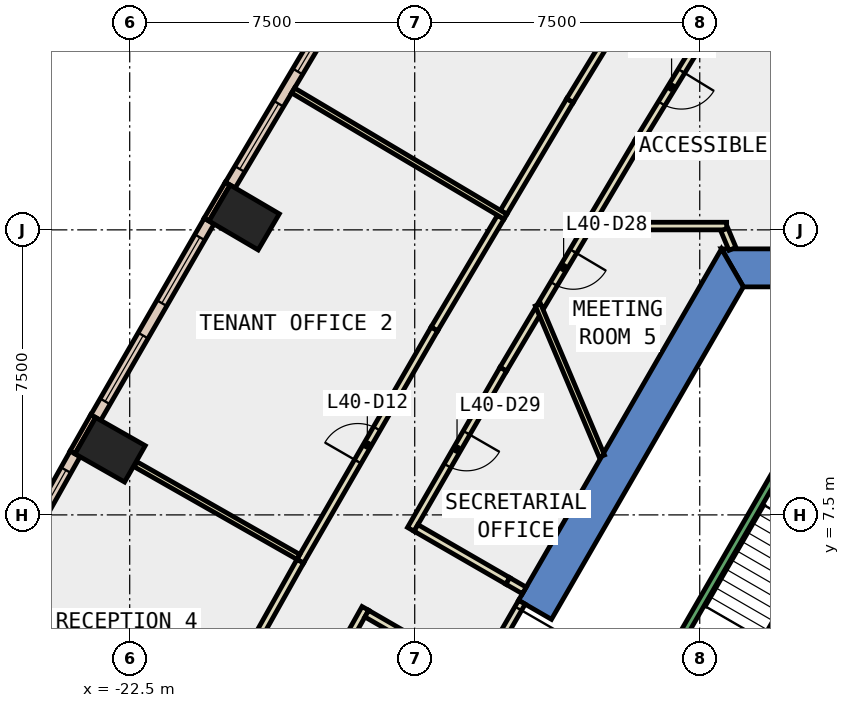
"""IFC4 building model, lengths in metres.
Left out: names, types, materials, properties, quantities, classifications, styles, units other than length and angle.
Written with IfcOpenShell. Run it as: python <this file> out.ifc"""

import sys

from ifc_helpers import new_model, si_unit, direction, frame, frame_2d, origin, origin_2d, place, context, subcontext, project, spatial, polyline, rectangle, outline, extrude, element, fill, save


model = new_model("IFC4")
c1 = context("Model", 3, precision=1e-05, world=origin(), true_north=direction((0.0, 1.0)))
c2 = subcontext(c1, "Body", "Model", "MODEL_VIEW")
j1 = project(units=[si_unit("LENGTHUNIT", "METRE"), si_unit("PLANEANGLEUNIT", "RADIAN")], contexts=[c1])
p1 = place(None, origin())
s1 = spatial("IfcSite", under=j1, at=p1, CompositionType="ELEMENT")
p2 = place(p1, origin())
s2 = spatial("IfcBuilding", under=s1, at=p2, CompositionType="ELEMENT")
p3 = place(p2, frame((0.0, 0.0, 180.2)))
s3 = spatial("IfcBuildingStorey", under=s2, at=p3, CompositionType="ELEMENT", Elevation=180.2)
for number, where, z_axis, x_axis in (
    (1, (-19.488, 15.326, -0.4), (0.0, 0.0, 1.0), (0.506, 0.863, 0.0)),
    (2, (-23.015, 9.214, -0.4), (0.0, 0.0, 1.0), (0.494, 0.869, 0.0)),
):
    element("IfcColumn", number, at=place(p3, frame(where, z_axis=z_axis, x_axis=x_axis)), inside=s3, PredefinedType="COLUMN", context=c2, shape_type="SweptSolid", body=[
        extrude(rectangle(XDim=1.1, YDim=1.5, at=origin_2d()), origin(), (0.0, 0.0, 1.0), 4.0),
    ])
p4 = place(p3, frame((0.0, 0.0, -0.4)))
e3 = element("IfcWall", 3, at=p4, inside=s3, PredefinedType="SHEAR", context=c2, shape_type="SweptSolid", body=[
    extrude(outline(polyline([(6.928, 14.5), (-6.928, 14.5), (-6.351, 13.5), (6.351, 13.5), (6.928, 14.5)])), origin(), (0.0, 0.0, 1.0), 4.0),
])
p5 = place(p3, frame((0.0, 0.0, -0.4)))
e4 = element("IfcWall", 4, at=p5, inside=s3, PredefinedType="SHEAR", context=c2, shape_type="SweptSolid", body=[
    extrude(outline(polyline([(-12.267, 5.252), (-11.402, 4.752), (-6.351, 13.5), (-6.928, 14.5), (-12.267, 5.252)])), origin(), (0.0, 0.0, 1.0), 4.0),
])
p6 = place(p3, frame((-19.921, 16.217, 0.0), z_axis=(0.0, 0.0, 1.0), x_axis=(-0.50667077411, -0.862139621327, 0.0)))
e5 = element("IfcWall", 5, at=p6, inside=s3, PredefinedType="STANDARD", context=c2, shape_type="SweptSolid", body=[
    extrude(rectangle(XDim=1.1, YDim=0.15, at=frame_2d((0.55, 0.0))), origin(), (0.0, 0.0, 1.0), 3.6),
])
p7 = place(p3, frame((-23.461, 10.1, 0.0), z_axis=(0.0, 0.0, 1.0), x_axis=(-0.494512685492, -0.869170411305, 0.0)))
e6 = element("IfcWall", 6, at=p7, inside=s3, PredefinedType="STANDARD", context=c2, shape_type="SweptSolid", body=[
    extrude(rectangle(XDim=1.1, YDim=0.15, at=frame_2d((0.55, 0.0))), origin(), (0.0, 0.0, 1.0), 3.6),
])
p8 = place(p3, frame((-16.806, 21.309, 0.0), z_axis=(0.0, 0.0, 1.0), x_axis=(-0.510653096173, -0.859786842984, 0.0)))
e7 = element("IfcWall", 7, at=p8, inside=s3, PredefinedType="STANDARD", context=c2, shape_type="SweptSolid", body=[
    extrude(rectangle(XDim=5.969, YDim=0.3, at=frame_2d((2.984, 0.0))), origin(), (0.0, 0.0, 1.0), 3.6),
])
p9 = place(p8, frame((0.492, 0.0, 0.9)))
e8 = element("IfcOpeningElement", 8, at=p9, cuts=e7, PredefinedType="OPENING", context=c2, shape_type="SweptSolid", body=[
    extrude(rectangle(XDim=2.0, YDim=2.6, at=frame_2d((1.0, 1.3))), frame((0.0, 0.16, 0.0), z_axis=(0.0, -1.0, 0.0), x_axis=(1.0, 0.0, 0.0)), (0.0, 0.0, 1.0), 0.32),
])
p10 = place(p8, frame((3.477, 0.0, 0.9)))
e9 = element("IfcOpeningElement", 9, at=p10, cuts=e7, PredefinedType="OPENING", context=c2, shape_type="SweptSolid", body=[
    extrude(rectangle(XDim=2.0, YDim=2.6, at=frame_2d((1.0, 1.3))), frame((0.0, 0.16, 0.0), z_axis=(0.0, -1.0, 0.0), x_axis=(1.0, 0.0, 0.0)), (0.0, 0.0, 1.0), 0.32),
])
p11 = place(p3, frame((-20.409, 15.23, 0.0), z_axis=(0.0, 0.0, 1.0), x_axis=(-0.499908916093, -0.866077984716, 0.0)))
e10 = element("IfcWall", 10, at=p11, inside=s3, PredefinedType="STANDARD", context=c2, shape_type="SweptSolid", body=[
    extrude(rectangle(XDim=5.969, YDim=0.3, at=frame_2d((2.985, 0.0))), origin(), (0.0, 0.0, 1.0), 3.6),
])
p12 = place(p11, frame((0.492, 0.0, 0.9)))
e11 = element("IfcOpeningElement", 11, at=p12, cuts=e10, PredefinedType="OPENING", context=c2, shape_type="SweptSolid", body=[
    extrude(rectangle(XDim=2.0, YDim=2.6, at=frame_2d((1.0, 1.3))), frame((0.0, 0.16, 0.0), z_axis=(0.0, -1.0, 0.0), x_axis=(1.0, 0.0, 0.0)), (0.0, 0.0, 1.0), 0.32),
])
p13 = place(p11, frame((3.477, 0.0, 0.9)))
e12 = element("IfcOpeningElement", 12, at=p13, cuts=e10, PredefinedType="OPENING", context=c2, shape_type="SweptSolid", body=[
    extrude(rectangle(XDim=2.0, YDim=2.6, at=frame_2d((1.0, 1.3))), frame((0.0, 0.16, 0.0), z_axis=(0.0, -1.0, 0.0), x_axis=(1.0, 0.0, 0.0)), (0.0, 0.0, 1.0), 0.32),
])
p14 = place(p3, frame((-23.936, 9.106, 0.0), z_axis=(0.0, 0.0, 1.0), x_axis=(-0.489305602904, -0.872112393541, 0.0)))
e13 = element("IfcWall", 13, at=p14, inside=s3, PredefinedType="STANDARD", context=c2, shape_type="SweptSolid", body=[
    extrude(rectangle(XDim=5.969, YDim=0.3, at=frame_2d((2.985, 0.0))), origin(), (0.0, 0.0, 1.0), 3.6),
])
p15 = place(p14, frame((0.492, 0.0, 0.9)))
e14 = element("IfcOpeningElement", 14, at=p15, cuts=e13, PredefinedType="OPENING", context=c2, shape_type="SweptSolid", body=[
    extrude(rectangle(XDim=2.0, YDim=2.6, at=frame_2d((1.0, 1.3))), frame((0.0, 0.16, 0.0), z_axis=(0.0, -1.0, 0.0), x_axis=(1.0, 0.0, 0.0)), (0.0, 0.0, 1.0), 0.32),
])
p16 = place(p14, frame((3.477, 0.0, 0.9)))
e15 = element("IfcOpeningElement", 15, at=p16, cuts=e13, PredefinedType="OPENING", context=c2, shape_type="SweptSolid", body=[
    extrude(rectangle(XDim=2.0, YDim=2.6, at=frame_2d((1.0, 1.3))), frame((0.0, 0.16, 0.0), z_axis=(0.0, -1.0, 0.0), x_axis=(1.0, 0.0, 0.0)), (0.0, 0.0, 1.0), 0.32),
])
p17 = place(p3, frame((-10.484, 15.014, 0.0), z_axis=(0.0, 0.0, 1.0), x_axis=(-0.510627855782, -0.859801833506, 0.0)))
e16 = element("IfcWall", 16, at=p17, inside=s3, PredefinedType="PARTITIONING", context=c2, shape_type="SweptSolid", body=[
    extrude(rectangle(XDim=2.342, YDim=0.2, at=frame_2d((1.171, 0.0))), origin(), (0.0, 0.0, 1.0), 3.6),
])
p18 = place(p17, frame((0.671, 0.0, 0.0)))
e17 = element("IfcOpeningElement", 17, at=p18, cuts=e16, PredefinedType="OPENING", context=c2, shape_type="SweptSolid", body=[
    extrude(rectangle(XDim=1.0, YDim=2.1, at=frame_2d((0.5, 1.05))), frame((0.0, 0.11, 0.0), z_axis=(0.0, -1.0, 0.0), x_axis=(1.0, 0.0, 0.0)), (0.0, 0.0, 1.0), 0.22),
])
p19 = place(p3, frame((-11.757, 12.871, 0.0), z_axis=(0.0, 0.0, 1.0), x_axis=(-0.510614478889, -0.85980977777, 0.0)))
e18 = element("IfcWall", 18, at=p19, inside=s3, PredefinedType="PARTITIONING", context=c2, shape_type="SweptSolid", body=[
    extrude(rectangle(XDim=1.788, YDim=0.2, at=frame_2d((0.894, 0.0))), origin(), (0.0, 0.0, 1.0), 3.6),
])
p20 = place(p3, frame((-12.67, 11.334, 0.0), z_axis=(0.0, 0.0, 1.0), x_axis=(-0.500035159864, -0.866005103276, 0.0)))
e19 = element("IfcWall", 19, at=p20, inside=s3, PredefinedType="PARTITIONING", context=c2, shape_type="SweptSolid", body=[
    extrude(rectangle(XDim=4.866, YDim=0.2, at=frame_2d((2.433, 0.0))), origin(), (0.0, 0.0, 1.0), 3.6),
])
p21 = place(p20, frame((1.933, 0.0, 0.0)))
e20 = element("IfcOpeningElement", 20, at=p21, cuts=e19, PredefinedType="OPENING", context=c2, shape_type="SweptSolid", body=[
    extrude(rectangle(XDim=1.0, YDim=2.1, at=frame_2d((0.5, 1.05))), frame((0.0, 0.11, 0.0), z_axis=(0.0, -1.0, 0.0), x_axis=(1.0, 0.0, 0.0)), (0.0, 0.0, 1.0), 0.22),
])
p22 = place(p3, frame((-14.966, 7.157, 0.0), z_axis=(0.0, 0.0, 1.0), x_axis=(0.86600487494, -0.500035555316, 0.0)))
e21 = element("IfcWall", 21, at=p22, inside=s3, PredefinedType="PARTITIONING", context=c2, shape_type="SweptSolid", body=[
    extrude(rectangle(XDim=2.79, YDim=0.2, at=frame_2d((1.395, 0.0))), origin(), (0.0, 0.0, 1.0), 3.6),
])
p23 = place(p3, frame((-7.365, 20.185, 0.0), z_axis=(0.0, 0.0, 1.0), x_axis=(-0.521352973407, -0.853341125881, 0.0)))
e22 = element("IfcWall", 22, at=p23, inside=s3, PredefinedType="PARTITIONING", context=c2, shape_type="SweptSolid", body=[
    extrude(rectangle(XDim=3.359, YDim=0.2, at=frame_2d((1.679, 0.0))), origin(), (0.0, 0.0, 1.0), 3.6),
])
p24 = place(p23, frame((1.18, 0.0, 0.0)))
e23 = element("IfcOpeningElement", 23, at=p24, cuts=e22, PredefinedType="OPENING", context=c2, shape_type="SweptSolid", body=[
    extrude(rectangle(XDim=1.0, YDim=2.1, at=frame_2d((0.5, 1.05))), frame((0.0, 0.11, 0.0), z_axis=(0.0, -1.0, 0.0), x_axis=(1.0, 0.0, 0.0)), (0.0, 0.0, 1.0), 0.22),
])
p25 = place(p3, frame((-9.116, 17.319, 0.0), z_axis=(0.0, 0.0, 1.0), x_axis=(-0.510422773569, -0.859923596735, 0.0)))
e24 = element("IfcWall", 24, at=p25, inside=s3, PredefinedType="PARTITIONING", context=c2, shape_type="SweptSolid", body=[
    extrude(rectangle(XDim=2.48, YDim=0.2, at=frame_2d((1.24, 0.0))), origin(), (0.0, 0.0, 1.0), 3.6),
])
p26 = place(p3, frame((-16.299, 5.04, 0.0), z_axis=(0.0, 0.0, 1.0), x_axis=(-0.489219677344, -0.872160597195, 0.0)))
e25 = element("IfcWall", 25, at=p26, inside=s3, PredefinedType="PARTITIONING", context=c2, shape_type="SweptSolid", body=[
    extrude(rectangle(XDim=6.657, YDim=0.2, at=frame_2d((3.329, 0.0))), origin(), (0.0, 0.0, 1.0), 3.6),
])
p27 = place(p3, frame((-12.66, 15.463, 0.0), z_axis=(0.0, 0.0, 1.0), x_axis=(0.510477693133, 0.85989099589, 0.0)))
e26 = element("IfcWall", 26, at=p27, inside=s3, PredefinedType="PARTITIONING", context=c2, shape_type="SweptSolid", body=[
    extrude(rectangle(XDim=3.418, YDim=0.2, at=frame_2d((1.709, 0.0))), origin(), (0.0, 0.0, 1.0), 3.6),
])
p28 = place(p3, frame((-10.915, 18.402, 0.0), z_axis=(0.0, 0.0, 1.0), x_axis=(0.521189997761, 0.853440675287, 0.0)))
e27 = element("IfcWall", 27, at=p28, inside=s3, PredefinedType="PARTITIONING", context=c2, shape_type="SweptSolid", body=[
    extrude(rectangle(XDim=6.913, YDim=0.2, at=frame_2d((3.457, 0.0))), origin(), (0.0, 0.0, 1.0), 3.6),
])
p29 = place(p28, frame((3.031, 0.0, 0.0)))
e28 = element("IfcOpeningElement", 28, at=p29, cuts=e27, PredefinedType="OPENING", context=c2, shape_type="SweptSolid", body=[
    extrude(rectangle(XDim=1.0, YDim=2.1, at=frame_2d((0.5, 1.05))), frame((0.0, 0.11, 0.0), z_axis=(0.0, -1.0, 0.0), x_axis=(1.0, 0.0, 0.0)), (0.0, 0.0, 1.0), 0.22),
])
p30 = place(p3, frame((-18.012, 6.28, 0.0), z_axis=(0.0, 0.0, 1.0), x_axis=(0.49995092924, 0.866053732947, 0.0)))
e29 = element("IfcWall", 29, at=p30, inside=s3, PredefinedType="PARTITIONING", context=c2, shape_type="SweptSolid", body=[
    extrude(rectangle(XDim=7.061, YDim=0.2, at=frame_2d((3.53, 0.0))), origin(), (0.0, 0.0, 1.0), 3.6),
])
p31 = place(p30, frame((3.03, 0.0, 0.0)))
e30 = element("IfcOpeningElement", 30, at=p31, cuts=e29, PredefinedType="OPENING", context=c2, shape_type="SweptSolid", body=[
    extrude(rectangle(XDim=1.0, YDim=2.1, at=frame_2d((0.5, 1.05))), frame((0.0, 0.11, 0.0), z_axis=(0.0, -1.0, 0.0), x_axis=(1.0, 0.0, 0.0)), (0.0, 0.0, 1.0), 0.22),
])
p32 = place(p3, frame((-14.482, 12.395, 0.0), z_axis=(0.0, 0.0, 1.0), x_axis=(0.51050904729, 0.859872381598, 0.0)))
e31 = element("IfcWall", 31, at=p32, inside=s3, PredefinedType="PARTITIONING", context=c2, shape_type="SweptSolid", body=[
    extrude(rectangle(XDim=3.418, YDim=0.2, at=frame_2d((1.709, 0.0))), origin(), (0.0, 0.0, 1.0), 3.6),
])
p33 = place(p3, frame((-21.43, 0.185, 0.0), z_axis=(0.0, 0.0, 1.0), x_axis=(0.489124577711, 0.872213934468, 0.0)))
e32 = element("IfcWall", 32, at=p33, inside=s3, PredefinedType="PARTITIONING", context=c2, shape_type="SweptSolid", body=[
    extrude(rectangle(XDim=6.988, YDim=0.2, at=frame_2d((3.494, 0.0))), origin(), (0.0, 0.0, 1.0), 3.6),
])
p34 = place(p33, frame((3.069, 0.0, 0.0)))
e33 = element("IfcOpeningElement", 33, at=p34, cuts=e32, PredefinedType="OPENING", context=c2, shape_type="SweptSolid", body=[
    extrude(rectangle(XDim=1.0, YDim=2.1, at=frame_2d((0.5, 1.05))), frame((0.0, 0.11, 0.0), z_axis=(0.0, -1.0, 0.0), x_axis=(1.0, 0.0, 0.0)), (0.0, 0.0, 1.0), 0.22),
])
p35 = place(p3, frame((-10.076, 9.047, 0.0), z_axis=(0.0, 0.0, 1.0), x_axis=(-0.389223462263, 0.921143363665, 0.0)))
e34 = element("IfcWall", 34, at=p35, inside=s3, PredefinedType="PARTITIONING", context=c2, shape_type="SweptSolid", body=[
    extrude(rectangle(XDim=4.322, YDim=0.15, at=frame_2d((2.161, 0.0))), origin(), (0.0, 0.0, 1.0), 3.6),
])
p36 = place(p3, frame((-6.792, 15.1, 0.0), z_axis=(0.0, 0.0, 1.0), x_axis=(-1.0, 0.0, 0.0)))
e35 = element("IfcWall", 35, at=p36, inside=s3, PredefinedType="PARTITIONING", context=c2, shape_type="SweptSolid", body=[
    extrude(rectangle(XDim=3.741, YDim=0.2, at=frame_2d((1.871, 0.0))), origin(), (0.0, 0.0, 1.0), 3.6),
])
p37 = place(p3, frame((-6.639, 14.5, 0.0), z_axis=(0.0, 0.0, 1.0), x_axis=(-0.388353930402, 0.921510295516, 0.0)))
e36 = element("IfcWall", 36, at=p37, inside=s3, PredefinedType="PARTITIONING", context=c2, shape_type="SweptSolid", body=[
    extrude(rectangle(XDim=0.551, YDim=0.2, at=frame_2d((0.276, 0.0))), origin(), (0.0, 0.0, 1.0), 3.6),
])
p38 = place(p3, frame((-12.613, 15.348, 0.0), z_axis=(0.0, 0.0, 1.0), x_axis=(-0.85976815765, 0.510684555368, 0.0)))
e37 = element("IfcWall", 37, at=p38, inside=s3, PredefinedType="PARTITIONING", context=c2, shape_type="SweptSolid", body=[
    extrude(rectangle(XDim=6.499, YDim=0.15, at=frame_2d((3.25, 0.0))), origin(), (0.0, 0.0, 1.0), 3.6),
])
p39 = place(p3, frame((-18.062, 6.395, 0.0), z_axis=(0.0, 0.0, 1.0), x_axis=(-0.869113540562, 0.494612629854, 0.0)))
e38 = element("IfcWall", 38, at=p39, inside=s3, PredefinedType="PARTITIONING", context=c2, shape_type="SweptSolid", body=[
    extrude(rectangle(XDim=4.929, YDim=0.15, at=frame_2d((2.465, 0.0))), origin(), (0.0, 0.0, 1.0), 3.6),
])
p40 = place(p3, frame((-12.18, 5.202, 0.0), z_axis=(0.0, 0.0, 1.0), x_axis=(-0.50002537861, -0.866010750942, 0.0)))
e39 = element("IfcWall", 39, at=p40, inside=s3, PredefinedType="PARTITIONING", context=c2, shape_type="SweptSolid", body=[
    extrude(rectangle(XDim=2.0, YDim=0.2, at=frame_2d((1.0, 0.0))), origin(), (0.0, 0.0, 1.0), 2.4),
])
p41 = place(p40, frame((0.19, 0.0, 0.0)))
e40 = element("IfcOpeningElement", 40, at=p41, cuts=e39, PredefinedType="OPENING", context=c2, shape_type="SweptSolid", body=[
    extrude(rectangle(XDim=1.8, YDim=2.1, at=frame_2d((0.9, 1.05))), frame((0.0, 0.11, 0.0), z_axis=(0.0, -1.0, 0.0), x_axis=(1.0, 0.0, 0.0)), (0.0, 0.0, 1.0), 0.22),
])
p42 = place(p3, frame((-12.55, 5.762, 0.0), z_axis=(0.0, 0.0, 1.0), x_axis=(0.866071776036, -0.499919672301, 0.0)))
e41 = element("IfcWall", 41, at=p42, inside=s3, PredefinedType="PARTITIONING", context=c2, shape_type="SweptSolid", body=[
    extrude(rectangle(XDim=0.5, YDim=0.2, at=frame_2d((0.25, 0.0))), origin(), (0.0, 0.0, 1.0), 2.4),
])
p43 = place(p3, frame((-13.85, 3.51, 0.0), z_axis=(0.0, 0.0, 1.0), x_axis=(-0.866087780421, 0.49989194493, 0.0)))
e42 = element("IfcWall", 42, at=p43, inside=s3, PredefinedType="PARTITIONING", context=c2, shape_type="SweptSolid", body=[
    extrude(rectangle(XDim=2.785, YDim=0.2, at=frame_2d((1.392, 0.0))), origin(), (0.0, 0.0, 1.0), 3.6),
])
p44 = place(p3, frame((-5.03, 9.388, 0.0), z_axis=(0.0, 0.0, 1.0), x_axis=(-0.499978703459, -0.866037698999, 0.0)))
e43 = element("IfcWall", 43, at=p44, inside=s3, PredefinedType="STANDARD", context=c2, shape_type="SweptSolid", body=[
    extrude(rectangle(XDim=6.9, YDim=0.2, at=frame_2d((3.45, 0.0))), origin(), (0.0, 0.0, 1.0), 3.6),
])
p45 = place(p9, origin())
e44 = element("IfcWindow", 44, at=p45, inside=s3, PartitioningType="SINGLE_PANEL", PredefinedType="WINDOW", context=c2, shape_type="SweptSolid", body=[
    extrude(rectangle(XDim=2.0, YDim=2.6, at=frame_2d((1.0, 1.3))), frame((0.0, 0.03, 0.0), z_axis=(0.0, -1.0, 0.0), x_axis=(1.0, 0.0, 0.0)), (0.0, 0.0, 1.0), 0.06),
])
fill(e8, e44)
p46 = place(p10, origin())
e45 = element("IfcWindow", 45, at=p46, inside=s3, PartitioningType="SINGLE_PANEL", PredefinedType="WINDOW", context=c2, shape_type="SweptSolid", body=[
    extrude(rectangle(XDim=2.0, YDim=2.6, at=frame_2d((1.0, 1.3))), frame((0.0, 0.03, 0.0), z_axis=(0.0, -1.0, 0.0), x_axis=(1.0, 0.0, 0.0)), (0.0, 0.0, 1.0), 0.06),
])
fill(e9, e45)
p47 = place(p12, origin())
e46 = element("IfcWindow", 46, at=p47, inside=s3, PartitioningType="SINGLE_PANEL", PredefinedType="WINDOW", context=c2, shape_type="SweptSolid", body=[
    extrude(rectangle(XDim=2.0, YDim=2.6, at=frame_2d((1.0, 1.3))), frame((0.0, 0.03, 0.0), z_axis=(0.0, -1.0, 0.0), x_axis=(1.0, 0.0, 0.0)), (0.0, 0.0, 1.0), 0.06),
])
fill(e11, e46)
p48 = place(p13, origin())
e47 = element("IfcWindow", 47, at=p48, inside=s3, PartitioningType="SINGLE_PANEL", PredefinedType="WINDOW", context=c2, shape_type="SweptSolid", body=[
    extrude(rectangle(XDim=2.0, YDim=2.6, at=frame_2d((1.0, 1.3))), frame((0.0, 0.03, 0.0), z_axis=(0.0, -1.0, 0.0), x_axis=(1.0, 0.0, 0.0)), (0.0, 0.0, 1.0), 0.06),
])
fill(e12, e47)
p49 = place(p15, origin())
e48 = element("IfcWindow", 48, at=p49, inside=s3, PartitioningType="SINGLE_PANEL", PredefinedType="WINDOW", context=c2, shape_type="SweptSolid", body=[
    extrude(rectangle(XDim=2.0, YDim=2.6, at=frame_2d((1.0, 1.3))), frame((0.0, 0.03, 0.0), z_axis=(0.0, -1.0, 0.0), x_axis=(1.0, 0.0, 0.0)), (0.0, 0.0, 1.0), 0.06),
])
fill(e14, e48)
p50 = place(p31, origin())
e49 = element("IfcDoor", 49, at=p50, inside=s3, OperationType="SINGLE_SWING_LEFT", PredefinedType="DOOR", context=c2, shape_type="SweptSolid", body=[
    extrude(rectangle(XDim=1.0, YDim=2.1, at=frame_2d((0.5, 1.05))), frame((0.0, 0.025, 0.0), z_axis=(0.0, -1.0, 0.0), x_axis=(1.0, 0.0, 0.0)), (0.0, 0.0, 1.0), 0.05),
])
fill(e30, e49)
p51 = place(p24, origin())
e50 = element("IfcDoor", 50, at=p51, inside=s3, OperationType="SINGLE_SWING_LEFT", PredefinedType="DOOR", context=c2, shape_type="SweptSolid", body=[
    extrude(rectangle(XDim=1.0, YDim=2.1, at=frame_2d((0.5, 1.05))), frame((0.0, 0.025, 0.0), z_axis=(0.0, -1.0, 0.0), x_axis=(1.0, 0.0, 0.0)), (0.0, 0.0, 1.0), 0.05),
])
fill(e23, e50)
p52 = place(p18, origin())
e51 = element("IfcDoor", 51, at=p52, inside=s3, OperationType="SINGLE_SWING_LEFT", PredefinedType="DOOR", context=c2, shape_type="SweptSolid", body=[
    extrude(rectangle(XDim=1.0, YDim=2.1, at=frame_2d((0.5, 1.05))), frame((0.0, 0.025, 0.0), z_axis=(0.0, -1.0, 0.0), x_axis=(1.0, 0.0, 0.0)), (0.0, 0.0, 1.0), 0.05),
])
fill(e17, e51)
p53 = place(p21, origin())
e52 = element("IfcDoor", 52, at=p53, inside=s3, OperationType="SINGLE_SWING_LEFT", PredefinedType="DOOR", context=c2, shape_type="SweptSolid", body=[
    extrude(rectangle(XDim=1.0, YDim=2.1, at=frame_2d((0.5, 1.05))), frame((0.0, 0.025, 0.0), z_axis=(0.0, -1.0, 0.0), x_axis=(1.0, 0.0, 0.0)), (0.0, 0.0, 1.0), 0.05),
])
fill(e20, e52)
p54 = place(p41, origin())
e53 = element("IfcDoor", 53, at=p54, inside=s3, OperationType="DOUBLE_DOOR_SINGLE_SWING", PredefinedType="DOOR", context=c2, shape_type="SweptSolid", body=[
    extrude(rectangle(XDim=1.8, YDim=2.1, at=frame_2d((0.9, 1.05))), frame((0.0, 0.025, 0.0), z_axis=(0.0, -1.0, 0.0), x_axis=(1.0, 0.0, 0.0)), (0.0, 0.0, 1.0), 0.05),
])
fill(e40, e53)
save(model, sys.argv[1])
